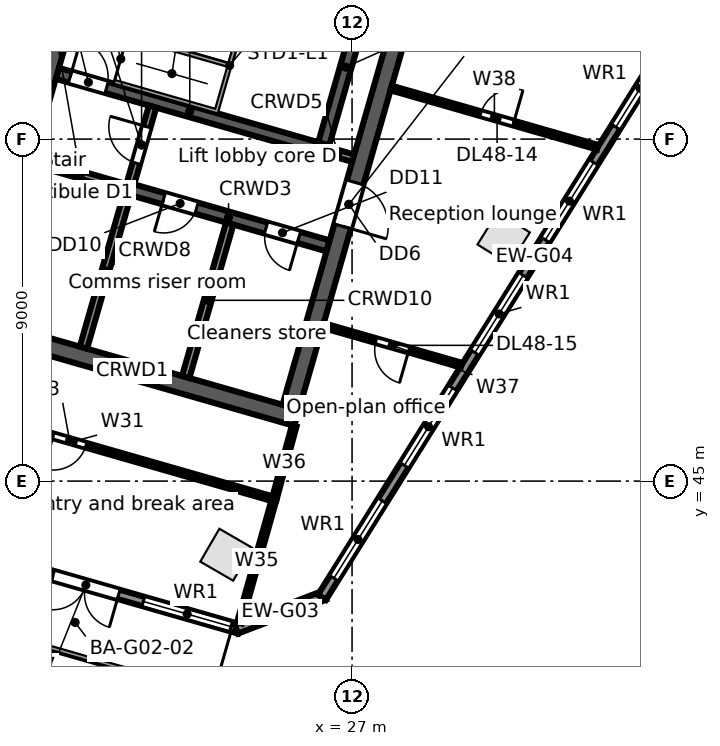
"""IFC4 building model, lengths in metres.
Left out: names, types, materials, properties, quantities, classifications, styles, units other than length and angle.
Written with IfcOpenShell. Run it as: python <this file> out.ifc"""

import sys

from ifc_helpers import new_model, si_unit, direction, frame, frame_2d, origin, origin_2d, place, context, subcontext, project, spatial, rectangle, extrude, element, fill, save


model = new_model("IFC4")
c1 = context("Model", 3, precision=1e-05, world=origin(), true_north=direction((0.0, 1.0)))
c2 = subcontext(c1, "Body", "Model", "MODEL_VIEW")
j1 = project(units=[si_unit("LENGTHUNIT", "METRE"), si_unit("PLANEANGLEUNIT", "RADIAN")], contexts=[c1])
p1 = place(None, origin())
s1 = spatial("IfcSite", under=j1, at=p1, CompositionType="ELEMENT")
p2 = place(p1, origin())
s2 = spatial("IfcBuilding", under=s1, at=p2, CompositionType="ELEMENT")
p3 = place(p2, frame((0.0, 0.0, 223.1)))
s3 = spatial("IfcBuildingStorey", under=s2, at=p3, CompositionType="ELEMENT", Elevation=223.1)
for number, where, z_axis, x_axis in (
    (1, (23.69, 43.063, 0.0), (0.0, 0.0, 1.0), (-0.865, 0.501, 0.0)),
    (2, (30.99, 51.386, 0.0), (0.0, 0.0, 1.0), (0.53, 0.848, 0.0)),
):
    element("IfcColumn", number, at=place(p3, frame(where, z_axis=z_axis, x_axis=x_axis)), inside=s3, PredefinedType="COLUMN", context=c2, shape_type="SweptSolid", body=[
        extrude(rectangle(XDim=1.0, YDim=1.0, at=origin_2d()), origin(), (0.0, 0.0, 1.0), 3.9),
    ])
p4 = place(p3, frame((24.034, 41.108, 0.0), z_axis=(0.0, 0.0, 1.0), x_axis=(-0.96126060691, 0.275641153683, 0.0)))
e3 = element("IfcWall", 3, at=p4, inside=s3, PredefinedType="STANDARD", context=c2, shape_type="SweptSolid", body=[
    extrude(rectangle(XDim=24.951, YDim=0.25, at=frame_2d((12.475, 0.0))), origin(), (0.0, 0.0, 1.0), 3.62),
])
p5 = place(p4, frame((22.416, 0.0, 0.8)))
e4 = element("IfcOpeningElement", 4, at=p5, cuts=e3, PredefinedType="OPENING", context=c2, shape_type="SweptSolid", body=[
    extrude(rectangle(XDim=2.4, YDim=2.2, at=frame_2d((1.2, 1.1))), frame((0.0, 0.135, 0.0), z_axis=(0.0, -1.0, 0.0), x_axis=(1.0, 0.0, 0.0)), (0.0, 0.0, 1.0), 0.27),
])
p6 = place(p4, frame((19.643, 0.0, 0.8)))
e5 = element("IfcOpeningElement", 5, at=p6, cuts=e3, PredefinedType="OPENING", context=c2, shape_type="SweptSolid", body=[
    extrude(rectangle(XDim=2.4, YDim=2.2, at=frame_2d((1.2, 1.1))), frame((0.0, 0.135, 0.0), z_axis=(0.0, -1.0, 0.0), x_axis=(1.0, 0.0, 0.0)), (0.0, 0.0, 1.0), 0.27),
])
p7 = place(p4, frame((16.869, 0.0, 0.8)))
e6 = element("IfcOpeningElement", 6, at=p7, cuts=e3, PredefinedType="OPENING", context=c2, shape_type="SweptSolid", body=[
    extrude(rectangle(XDim=2.4, YDim=2.2, at=frame_2d((1.2, 1.1))), frame((0.0, 0.135, 0.0), z_axis=(0.0, -1.0, 0.0), x_axis=(1.0, 0.0, 0.0)), (0.0, 0.0, 1.0), 0.27),
])
p8 = place(p4, frame((14.096, 0.0, 0.8)))
e7 = element("IfcOpeningElement", 7, at=p8, cuts=e3, PredefinedType="OPENING", context=c2, shape_type="SweptSolid", body=[
    extrude(rectangle(XDim=2.4, YDim=2.2, at=frame_2d((1.2, 1.1))), frame((0.0, 0.135, 0.0), z_axis=(0.0, -1.0, 0.0), x_axis=(1.0, 0.0, 0.0)), (0.0, 0.0, 1.0), 0.27),
])
p9 = place(p4, frame((11.622, 0.0, 0.0)))
e8 = element("IfcOpeningElement", 8, at=p9, cuts=e3, PredefinedType="OPENING", context=c2, shape_type="SweptSolid", body=[
    extrude(rectangle(XDim=1.8, YDim=2.4, at=frame_2d((0.9, 1.2))), frame((0.0, 0.135, 0.0), z_axis=(0.0, -1.0, 0.0), x_axis=(1.0, 0.0, 0.0)), (0.0, 0.0, 1.0), 0.27),
])
p10 = place(p4, frame((8.549, 0.0, 0.8)))
e9 = element("IfcOpeningElement", 9, at=p10, cuts=e3, PredefinedType="OPENING", context=c2, shape_type="SweptSolid", body=[
    extrude(rectangle(XDim=2.4, YDim=2.2, at=frame_2d((1.2, 1.1))), frame((0.0, 0.135, 0.0), z_axis=(0.0, -1.0, 0.0), x_axis=(1.0, 0.0, 0.0)), (0.0, 0.0, 1.0), 0.27),
])
p11 = place(p4, frame((5.775, 0.0, 0.8)))
e10 = element("IfcOpeningElement", 10, at=p11, cuts=e3, PredefinedType="OPENING", context=c2, shape_type="SweptSolid", body=[
    extrude(rectangle(XDim=2.4, YDim=2.2, at=frame_2d((1.2, 1.1))), frame((0.0, 0.135, 0.0), z_axis=(0.0, -1.0, 0.0), x_axis=(1.0, 0.0, 0.0)), (0.0, 0.0, 1.0), 0.27),
])
p12 = place(p4, frame((3.302, 0.0, 0.0)))
e11 = element("IfcOpeningElement", 11, at=p12, cuts=e3, PredefinedType="OPENING", context=c2, shape_type="SweptSolid", body=[
    extrude(rectangle(XDim=1.8, YDim=2.4, at=frame_2d((0.9, 1.2))), frame((0.0, 0.135, 0.0), z_axis=(0.0, -1.0, 0.0), x_axis=(1.0, 0.0, 0.0)), (0.0, 0.0, 1.0), 0.27),
])
p13 = place(p4, frame((0.229, 0.0, 0.8)))
e12 = element("IfcOpeningElement", 12, at=p13, cuts=e3, PredefinedType="OPENING", context=c2, shape_type="SweptSolid", body=[
    extrude(rectangle(XDim=2.4, YDim=2.2, at=frame_2d((1.2, 1.1))), frame((0.0, 0.135, 0.0), z_axis=(0.0, -1.0, 0.0), x_axis=(1.0, 0.0, 0.0)), (0.0, 0.0, 1.0), 0.27),
])
p14 = place(p3, frame((26.27, 41.993, 0.0), z_axis=(0.0, 0.0, 1.0), x_axis=(-0.933573798066, -0.358385216722, 0.0)))
e13 = element("IfcWall", 13, at=p14, inside=s3, PredefinedType="STANDARD", context=c2, shape_type="SweptSolid", body=[
    extrude(rectangle(XDim=2.48, YDim=0.25, at=frame_2d((1.24, 0.0))), origin(), (0.0, 0.0, 1.0), 3.62),
])
p15 = place(p3, frame((37.392, 59.84, 0.0), z_axis=(0.0, 0.0, 1.0), x_axis=(-0.529919909431, -0.848047692992, 0.0)))
e14 = element("IfcWall", 14, at=p15, inside=s3, PredefinedType="STANDARD", context=c2, shape_type="SweptSolid", body=[
    extrude(rectangle(XDim=21.104, YDim=0.25, at=frame_2d((10.552, 0.0))), origin(), (0.0, 0.0, 1.0), 3.62),
])
p16 = place(p15, frame((18.112, 0.0, 0.8)))
e15 = element("IfcOpeningElement", 15, at=p16, cuts=e14, PredefinedType="OPENING", context=c2, shape_type="SweptSolid", body=[
    extrude(rectangle(XDim=2.4, YDim=2.2, at=frame_2d((1.2, 1.1))), frame((0.0, 0.135, 0.0), z_axis=(0.0, -1.0, 0.0), x_axis=(1.0, 0.0, 0.0)), (0.0, 0.0, 1.0), 0.27),
])
p17 = place(p15, frame((14.612, 0.0, 0.8)))
e16 = element("IfcOpeningElement", 16, at=p17, cuts=e14, PredefinedType="OPENING", context=c2, shape_type="SweptSolid", body=[
    extrude(rectangle(XDim=2.4, YDim=2.2, at=frame_2d((1.2, 1.1))), frame((0.0, 0.135, 0.0), z_axis=(0.0, -1.0, 0.0), x_axis=(1.0, 0.0, 0.0)), (0.0, 0.0, 1.0), 0.27),
])
p18 = place(p15, frame((11.112, 0.0, 0.8)))
e17 = element("IfcOpeningElement", 17, at=p18, cuts=e14, PredefinedType="OPENING", context=c2, shape_type="SweptSolid", body=[
    extrude(rectangle(XDim=2.4, YDim=2.2, at=frame_2d((1.2, 1.1))), frame((0.0, 0.135, 0.0), z_axis=(0.0, -1.0, 0.0), x_axis=(1.0, 0.0, 0.0)), (0.0, 0.0, 1.0), 0.27),
])
p19 = place(p15, frame((7.612, 0.0, 0.8)))
e18 = element("IfcOpeningElement", 18, at=p19, cuts=e14, PredefinedType="OPENING", context=c2, shape_type="SweptSolid", body=[
    extrude(rectangle(XDim=2.4, YDim=2.2, at=frame_2d((1.2, 1.1))), frame((0.0, 0.135, 0.0), z_axis=(0.0, -1.0, 0.0), x_axis=(1.0, 0.0, 0.0)), (0.0, 0.0, 1.0), 0.27),
])
p20 = place(p15, frame((4.112, 0.0, 0.8)))
e19 = element("IfcOpeningElement", 19, at=p20, cuts=e14, PredefinedType="OPENING", context=c2, shape_type="SweptSolid", body=[
    extrude(rectangle(XDim=2.4, YDim=2.2, at=frame_2d((1.2, 1.1))), frame((0.0, 0.135, 0.0), z_axis=(0.0, -1.0, 0.0), x_axis=(1.0, 0.0, 0.0)), (0.0, 0.0, 1.0), 0.27),
])
p21 = place(p15, frame((0.612, 0.0, 0.8)))
e20 = element("IfcOpeningElement", 20, at=p21, cuts=e14, PredefinedType="OPENING", context=c2, shape_type="SweptSolid", body=[
    extrude(rectangle(XDim=2.4, YDim=2.2, at=frame_2d((1.2, 1.1))), frame((0.0, 0.135, 0.0), z_axis=(0.0, -1.0, 0.0), x_axis=(1.0, 0.0, 0.0)), (0.0, 0.0, 1.0), 0.27),
])
p22 = place(p3, frame((16.89, 49.149, 0.0), z_axis=(0.0, 0.0, 1.0), x_axis=(0.96126248289, -0.275634611374, 0.0)))
e21 = element("IfcWall", 21, at=p22, inside=s3, PredefinedType="SOLIDWALL", context=c2, shape_type="SweptSolid", body=[
    extrude(rectangle(XDim=9.0, YDim=0.45, at=frame_2d((4.5, 0.0))), origin(), (0.0, 0.0, 1.0), 3.62),
])
p23 = place(p3, frame((18.583, 53.423, 0.0), z_axis=(0.0, 0.0, 1.0), x_axis=(0.961259287968, -0.275645753268, 0.0)))
e22 = element("IfcWall", 22, at=p23, inside=s3, PredefinedType="SOLIDWALL", context=c2, shape_type="SweptSolid", body=[
    extrude(rectangle(XDim=2.65, YDim=0.2, at=frame_2d((1.325, 0.0))), origin(), (0.0, 0.0, 1.0), 3.62),
])
p24 = place(p3, frame((21.131, 52.692, 0.0), z_axis=(0.0, 0.0, 1.0), x_axis=(0.961261488075, -0.275638080722, 0.0)))
e23 = element("IfcWall", 23, at=p24, inside=s3, PredefinedType="SOLIDWALL", context=c2, shape_type="SweptSolid", body=[
    extrude(rectangle(XDim=5.45, YDim=0.3, at=frame_2d((2.725, 0.0))), origin(), (0.0, 0.0, 1.0), 3.62),
])
p25 = place(p24, frame((0.95, 0.0, 0.0)))
e24 = element("IfcOpeningElement", 24, at=p25, cuts=e23, PredefinedType="OPENING", context=c2, shape_type="SweptSolid", body=[
    extrude(rectangle(XDim=0.9, YDim=2.1, at=frame_2d((0.45, 1.05))), frame((0.0, 0.16, 0.0), z_axis=(0.0, -1.0, 0.0), x_axis=(1.0, 0.0, 0.0)), (0.0, 0.0, 1.0), 0.32),
])
p26 = place(p24, frame((3.75, 0.0, 0.0)))
e25 = element("IfcOpeningElement", 25, at=p26, cuts=e23, PredefinedType="OPENING", context=c2, shape_type="SweptSolid", body=[
    extrude(rectangle(XDim=0.9, YDim=2.1, at=frame_2d((0.45, 1.05))), frame((0.0, 0.16, 0.0), z_axis=(0.0, -1.0, 0.0), x_axis=(1.0, 0.0, 0.0)), (0.0, 0.0, 1.0), 0.32),
])
p27 = place(p3, frame((19.245, 55.73, 0.0), z_axis=(0.0, 0.0, 1.0), x_axis=(0.961263007877, -0.275632780503, 0.0)))
e26 = element("IfcWall", 26, at=p27, inside=s3, PredefinedType="SOLIDWALL", context=c2, shape_type="SweptSolid", body=[
    extrude(rectangle(XDim=7.25, YDim=0.3, at=frame_2d((3.625, 0.0))), origin(), (0.0, 0.0, 1.0), 3.62),
])
p28 = place(p27, frame((0.35, 0.0, 0.0)))
e27 = element("IfcOpeningElement", 27, at=p28, cuts=e26, PredefinedType="OPENING", context=c2, shape_type="SweptSolid", body=[
    extrude(rectangle(XDim=1.0, YDim=2.1, at=frame_2d((0.5, 1.05))), frame((0.0, 0.16, 0.0), z_axis=(0.0, -1.0, 0.0), x_axis=(1.0, 0.0, 0.0)), (0.0, 0.0, 1.0), 0.32),
])
p29 = place(p3, frame((26.214, 53.732, 0.0), z_axis=(0.0, 0.0, 1.0), x_axis=(0.961241665642, -0.275707200184, 0.0)))
e28 = element("IfcWall", 28, at=p29, inside=s3, PredefinedType="SOLIDWALL", context=c2, shape_type="SweptSolid", body=[
    extrude(rectangle(XDim=0.85, YDim=0.2, at=frame_2d((0.425, 0.0))), origin(), (0.0, 0.0, 1.0), 3.62),
])
p30 = place(p3, frame((17.168, 49.303, 0.0), z_axis=(0.0, 0.0, 1.0), x_axis=(0.275638974822, 0.961261231695, 0.0)))
e29 = element("IfcWall", 29, at=p30, inside=s3, PredefinedType="SOLIDWALL", context=c2, shape_type="SweptSolid", body=[
    extrude(rectangle(XDim=11.1, YDim=0.45, at=frame_2d((5.55, 0.0))), origin(), (0.0, 0.0, 1.0), 3.62),
])
p31 = place(p30, frame((4.95, 0.0, 0.0)))
e30 = element("IfcOpeningElement", 30, at=p31, cuts=e29, PredefinedType="OPENING", context=c2, shape_type="SweptSolid", body=[
    extrude(rectangle(XDim=1.2, YDim=2.1, at=frame_2d((0.6, 1.05))), frame((0.0, 0.235, 0.0), z_axis=(0.0, -1.0, 0.0), x_axis=(1.0, 0.0, 0.0)), (0.0, 0.0, 1.0), 0.47),
])
p32 = place(p3, frame((19.932, 48.511, 0.0), z_axis=(0.0, 0.0, 1.0), x_axis=(0.275642273411, 0.961260285827, 0.0)))
e31 = element("IfcWall", 31, at=p32, inside=s3, PredefinedType="SOLIDWALL", context=c2, shape_type="SweptSolid", body=[
    extrude(rectangle(XDim=4.2, YDim=0.2, at=frame_2d((2.1, 0.0))), origin(), (0.0, 0.0, 1.0), 3.62),
])
p33 = place(p3, frame((21.172, 52.837, 0.0), z_axis=(0.0, 0.0, 1.0), x_axis=(0.275657676022, 0.961255868981, 0.0)))
e32 = element("IfcWall", 32, at=p33, inside=s3, PredefinedType="PARTITIONING", context=c2, shape_type="SweptSolid", body=[
    extrude(rectangle(XDim=2.1, YDim=0.2, at=frame_2d((1.05, 0.0))), origin(), (0.0, 0.0, 1.0), 3.62),
])
p34 = place(p33, frame((0.55, 0.0, 0.0)))
e33 = element("IfcOpeningElement", 33, at=p34, cuts=e32, PredefinedType="OPENING", context=c2, shape_type="SweptSolid", body=[
    extrude(rectangle(XDim=1.0, YDim=2.1, at=frame_2d((0.5, 1.05))), frame((0.0, 0.11, 0.0), z_axis=(0.0, -1.0, 0.0), x_axis=(1.0, 0.0, 0.0)), (0.0, 0.0, 1.0), 0.22),
])
p35 = place(p3, frame((22.623, 47.739, 0.0), z_axis=(0.0, 0.0, 1.0), x_axis=(0.275642273411, 0.961260285827, 0.0)))
e34 = element("IfcWall", 34, at=p35, inside=s3, PredefinedType="PARTITIONING", context=c2, shape_type="SweptSolid", body=[
    extrude(rectangle(XDim=4.2, YDim=0.2, at=frame_2d((2.1, 0.0))), origin(), (0.0, 0.0, 1.0), 3.62),
])
p36 = place(p3, frame((26.256, 53.876, 0.0), z_axis=(0.0, 0.0, 1.0), x_axis=(0.275588560745, 0.96127568636, 0.0)))
e35 = element("IfcWall", 35, at=p36, inside=s3, PredefinedType="SOLIDWALL", context=c2, shape_type="SweptSolid", body=[
    extrude(rectangle(XDim=4.2, YDim=0.3, at=frame_2d((2.1, 0.0))), origin(), (0.0, 0.0, 1.0), 3.62),
])
p37 = place(p3, frame((25.387, 46.947, 0.0), z_axis=(0.0, 0.0, 1.0), x_axis=(0.275638974822, 0.961261231695, 0.0)))
e36 = element("IfcWall", 36, at=p37, inside=s3, PredefinedType="SOLIDWALL", context=c2, shape_type="SweptSolid", body=[
    extrude(rectangle(XDim=11.1, YDim=0.45, at=frame_2d((5.55, 0.0))), origin(), (0.0, 0.0, 1.0), 3.62),
])
p38 = place(p37, frame((4.95, 0.0, 0.0)))
e37 = element("IfcOpeningElement", 37, at=p38, cuts=e36, PredefinedType="OPENING", context=c2, shape_type="SweptSolid", body=[
    extrude(rectangle(XDim=1.2, YDim=2.1, at=frame_2d((0.6, 1.05))), frame((0.0, 0.235, 0.0), z_axis=(0.0, -1.0, 0.0), x_axis=(1.0, 0.0, 0.0)), (0.0, 0.0, 1.0), 0.47),
])
p39 = place(p3, frame((14.377, 47.555, 0.0), z_axis=(0.0, 0.0, 1.0), x_axis=(0.961263044958, -0.275632651182, 0.0)))
e38 = element("IfcWall", 38, at=p39, inside=s3, PredefinedType="PARTITIONING", context=c2, shape_type="SweptSolid", body=[
    extrude(rectangle(XDim=11.0, YDim=0.125, at=frame_2d((5.5, 0.0))), origin(), (0.0, 0.0, 1.0), 2.9),
])
p40 = place(p39, frame((4.95, 0.0, 0.0)))
e39 = element("IfcOpeningElement", 39, at=p40, cuts=e38, PredefinedType="OPENING", context=c2, shape_type="SweptSolid", body=[
    extrude(rectangle(XDim=0.9, YDim=2.1, at=frame_2d((0.45, 1.05))), frame((0.0, 0.073, 0.0), z_axis=(0.0, -1.0, 0.0), x_axis=(1.0, 0.0, 0.0)), (0.0, 0.0, 1.0), 0.145),
])
p41 = place(p3, frame((24.036, 41.27, 0.0), z_axis=(0.0, 0.0, 1.0), x_axis=(0.270787421954, 0.962639170256, 0.0)))
e40 = element("IfcWall", 40, at=p41, inside=s3, PredefinedType="PARTITIONING", context=c2, shape_type="SweptSolid", body=[
    extrude(rectangle(XDim=3.379, YDim=0.125, at=frame_2d((1.689, 0.0))), origin(), (0.0, 0.0, 1.0), 2.9),
])
p42 = place(p3, frame((24.951, 44.523, 0.0), z_axis=(0.0, 0.0, 1.0), x_axis=(0.264046927145, 0.964509834198, 0.0)))
e41 = element("IfcWall", 41, at=p42, inside=s3, PredefinedType="PARTITIONING", context=c2, shape_type="SweptSolid", body=[
    extrude(rectangle(XDim=2.0, YDim=0.125, at=frame_2d((1.0, 0.0))), origin(), (0.0, 0.0, 1.0), 2.9),
])
p43 = place(p3, frame((26.237, 49.096, 0.0), z_axis=(0.0, 0.0, 1.0), x_axis=(0.961285271066, -0.275555126304, 0.0)))
e42 = element("IfcWall", 42, at=p43, inside=s3, PredefinedType="PARTITIONING", context=c2, shape_type="SweptSolid", body=[
    extrude(rectangle(XDim=3.789, YDim=0.125, at=frame_2d((1.894, 0.0))), origin(), (0.0, 0.0, 1.0), 2.9),
])
p44 = place(p43, frame((1.45, 0.0, 0.0)))
e43 = element("IfcOpeningElement", 43, at=p44, cuts=e42, PredefinedType="OPENING", context=c2, shape_type="SweptSolid", body=[
    extrude(rectangle(XDim=0.9, YDim=2.1, at=frame_2d((0.45, 1.05))), frame((0.0, 0.073, 0.0), z_axis=(0.0, -1.0, 0.0), x_axis=(1.0, 0.0, 0.0)), (0.0, 0.0, 1.0), 0.145),
])
p45 = place(p3, frame((28.029, 55.344, 0.0), z_axis=(0.0, 0.0, 1.0), x_axis=(0.961249621014, -0.275679462603, 0.0)))
e44 = element("IfcWall", 44, at=p45, inside=s3, PredefinedType="PARTITIONING", context=c2, shape_type="SweptSolid", body=[
    extrude(rectangle(XDim=5.652, YDim=0.125, at=frame_2d((2.826, 0.0))), origin(), (0.0, 0.0, 1.0), 2.988),
])
p46 = place(p45, frame((2.45, 0.0, 0.0)))
e45 = element("IfcOpeningElement", 45, at=p46, cuts=e44, PredefinedType="OPENING", context=c2, shape_type="SweptSolid", body=[
    extrude(rectangle(XDim=0.9, YDim=2.1, at=frame_2d((0.45, 1.05))), frame((0.0, 0.073, 0.0), z_axis=(0.0, -1.0, 0.0), x_axis=(1.0, 0.0, 0.0)), (0.0, 0.0, 1.0), 0.145),
])
p47 = place(p12, origin())
e46 = element("IfcDoor", 46, at=p47, inside=s3, OperationType="DOUBLE_DOOR_SINGLE_SWING", PredefinedType="DOOR", context=c2, shape_type="SweptSolid", body=[
    extrude(rectangle(XDim=1.8, YDim=2.4, at=frame_2d((0.9, 1.2))), frame((0.0, 0.025, 0.0), z_axis=(0.0, -1.0, 0.0), x_axis=(1.0, 0.0, 0.0)), (0.0, 0.0, 1.0), 0.05),
])
fill(e11, e46)
p48 = place(p13, origin())
e47 = element("IfcWindow", 47, at=p48, inside=s3, PartitioningType="SINGLE_PANEL", PredefinedType="WINDOW", context=c2, shape_type="SweptSolid", body=[
    extrude(rectangle(XDim=2.4, YDim=2.2, at=frame_2d((1.2, 1.1))), frame((0.0, 0.03, 0.0), z_axis=(0.0, -1.0, 0.0), x_axis=(1.0, 0.0, 0.0)), (0.0, 0.0, 1.0), 0.06),
])
fill(e12, e47)
p49 = place(p16, origin())
e48 = element("IfcWindow", 48, at=p49, inside=s3, PartitioningType="SINGLE_PANEL", PredefinedType="WINDOW", context=c2, shape_type="SweptSolid", body=[
    extrude(rectangle(XDim=2.4, YDim=2.2, at=frame_2d((1.2, 1.1))), frame((0.0, 0.03, 0.0), z_axis=(0.0, -1.0, 0.0), x_axis=(1.0, 0.0, 0.0)), (0.0, 0.0, 1.0), 0.06),
])
fill(e15, e48)
p50 = place(p17, origin())
e49 = element("IfcWindow", 49, at=p50, inside=s3, PartitioningType="SINGLE_PANEL", PredefinedType="WINDOW", context=c2, shape_type="SweptSolid", body=[
    extrude(rectangle(XDim=2.4, YDim=2.2, at=frame_2d((1.2, 1.1))), frame((0.0, 0.03, 0.0), z_axis=(0.0, -1.0, 0.0), x_axis=(1.0, 0.0, 0.0)), (0.0, 0.0, 1.0), 0.06),
])
fill(e16, e49)
p51 = place(p18, origin())
e50 = element("IfcWindow", 50, at=p51, inside=s3, PartitioningType="SINGLE_PANEL", PredefinedType="WINDOW", context=c2, shape_type="SweptSolid", body=[
    extrude(rectangle(XDim=2.4, YDim=2.2, at=frame_2d((1.2, 1.1))), frame((0.0, 0.03, 0.0), z_axis=(0.0, -1.0, 0.0), x_axis=(1.0, 0.0, 0.0)), (0.0, 0.0, 1.0), 0.06),
])
fill(e17, e50)
p52 = place(p19, origin())
e51 = element("IfcWindow", 51, at=p52, inside=s3, PartitioningType="SINGLE_PANEL", PredefinedType="WINDOW", context=c2, shape_type="SweptSolid", body=[
    extrude(rectangle(XDim=2.4, YDim=2.2, at=frame_2d((1.2, 1.1))), frame((0.0, 0.03, 0.0), z_axis=(0.0, -1.0, 0.0), x_axis=(1.0, 0.0, 0.0)), (0.0, 0.0, 1.0), 0.06),
])
fill(e18, e51)
p53 = place(p20, origin())
e52 = element("IfcWindow", 52, at=p53, inside=s3, PartitioningType="SINGLE_PANEL", PredefinedType="WINDOW", context=c2, shape_type="SweptSolid", body=[
    extrude(rectangle(XDim=2.4, YDim=2.2, at=frame_2d((1.2, 1.1))), frame((0.0, 0.03, 0.0), z_axis=(0.0, -1.0, 0.0), x_axis=(1.0, 0.0, 0.0)), (0.0, 0.0, 1.0), 0.06),
])
fill(e19, e52)
p54 = place(p28, origin())
e53 = element("IfcDoor", 53, at=p54, inside=s3, OperationType="SINGLE_SWING_LEFT", PredefinedType="DOOR", context=c2, shape_type="SweptSolid", body=[
    extrude(rectangle(XDim=1.0, YDim=2.1, at=frame_2d((0.5, 1.05))), frame((0.0, 0.025, 0.0), z_axis=(0.0, -1.0, 0.0), x_axis=(1.0, 0.0, 0.0)), (0.0, 0.0, 1.0), 0.05),
])
fill(e27, e53)
p55 = place(p34, origin())
e54 = element("IfcDoor", 54, at=p55, inside=s3, OperationType="SINGLE_SWING_RIGHT", PredefinedType="DOOR", context=c2, shape_type="SweptSolid", body=[
    extrude(rectangle(XDim=1.0, YDim=2.1, at=frame_2d((0.5, 1.05))), frame((0.0, 0.025, 0.0), z_axis=(0.0, -1.0, 0.0), x_axis=(1.0, 0.0, 0.0)), (0.0, 0.0, 1.0), 0.05),
])
fill(e33, e54)
p56 = place(p38, frame((1.2, 0.0, 0.0), z_axis=(0.0, 0.0, 1.0), x_axis=(-1.0, 0.0, 0.0)))
e55 = element("IfcDoor", 55, at=p56, inside=s3, OperationType="SINGLE_SWING_RIGHT", PredefinedType="DOOR", context=c2, shape_type="SweptSolid", body=[
    extrude(rectangle(XDim=1.2, YDim=2.1, at=frame_2d((0.6, 1.05))), frame((0.0, 0.025, 0.0), z_axis=(0.0, -1.0, 0.0), x_axis=(1.0, 0.0, 0.0)), (0.0, 0.0, 1.0), 0.05),
])
fill(e37, e55)
p57 = place(p25, frame((0.9, 0.0, 0.0), z_axis=(0.0, 0.0, 1.0), x_axis=(-1.0, 0.0, 0.0)))
e56 = element("IfcDoor", 56, at=p57, inside=s3, OperationType="SINGLE_SWING_RIGHT", PredefinedType="DOOR", context=c2, shape_type="SweptSolid", body=[
    extrude(rectangle(XDim=0.9, YDim=2.1, at=frame_2d((0.45, 1.05))), frame((0.0, 0.025, 0.0), z_axis=(0.0, -1.0, 0.0), x_axis=(1.0, 0.0, 0.0)), (0.0, 0.0, 1.0), 0.05),
])
fill(e24, e56)
p58 = place(p26, frame((0.9, 0.0, 0.0), z_axis=(0.0, 0.0, 1.0), x_axis=(-1.0, 0.0, 0.0)))
e57 = element("IfcDoor", 57, at=p58, inside=s3, OperationType="SINGLE_SWING_LEFT", PredefinedType="DOOR", context=c2, shape_type="SweptSolid", body=[
    extrude(rectangle(XDim=0.9, YDim=2.1, at=frame_2d((0.45, 1.05))), frame((0.0, 0.025, 0.0), z_axis=(0.0, -1.0, 0.0), x_axis=(1.0, 0.0, 0.0)), (0.0, 0.0, 1.0), 0.05),
])
fill(e25, e57)
p59 = place(p40, frame((0.9, 0.0, 0.0), z_axis=(0.0, 0.0, 1.0), x_axis=(-1.0, 0.0, 0.0)))
e58 = element("IfcDoor", 58, at=p59, inside=s3, OperationType="SINGLE_SWING_RIGHT", PredefinedType="DOOR", context=c2, shape_type="SweptSolid", body=[
    extrude(rectangle(XDim=0.9, YDim=2.1, at=frame_2d((0.45, 1.05))), frame((0.0, 0.025, 0.0), z_axis=(0.0, -1.0, 0.0), x_axis=(1.0, 0.0, 0.0)), (0.0, 0.0, 1.0), 0.05),
])
fill(e39, e58)
p60 = place(p46, origin())
e59 = element("IfcDoor", 59, at=p60, inside=s3, OperationType="SINGLE_SWING_RIGHT", PredefinedType="DOOR", context=c2, shape_type="SweptSolid", body=[
    extrude(rectangle(XDim=0.9, YDim=2.1, at=frame_2d((0.45, 1.05))), frame((0.0, 0.025, 0.0), z_axis=(0.0, -1.0, 0.0), x_axis=(1.0, 0.0, 0.0)), (0.0, 0.0, 1.0), 0.05),
])
fill(e45, e59)
p61 = place(p44, frame((0.9, 0.0, 0.0), z_axis=(0.0, 0.0, 1.0), x_axis=(-1.0, 0.0, 0.0)))
e60 = element("IfcDoor", 60, at=p61, inside=s3, OperationType="SINGLE_SWING_LEFT", PredefinedType="DOOR", context=c2, shape_type="SweptSolid", body=[
    extrude(rectangle(XDim=0.9, YDim=2.1, at=frame_2d((0.45, 1.05))), frame((0.0, 0.025, 0.0), z_axis=(0.0, -1.0, 0.0), x_axis=(1.0, 0.0, 0.0)), (0.0, 0.0, 1.0), 0.05),
])
fill(e43, e60)
save(model, sys.argv[1])
